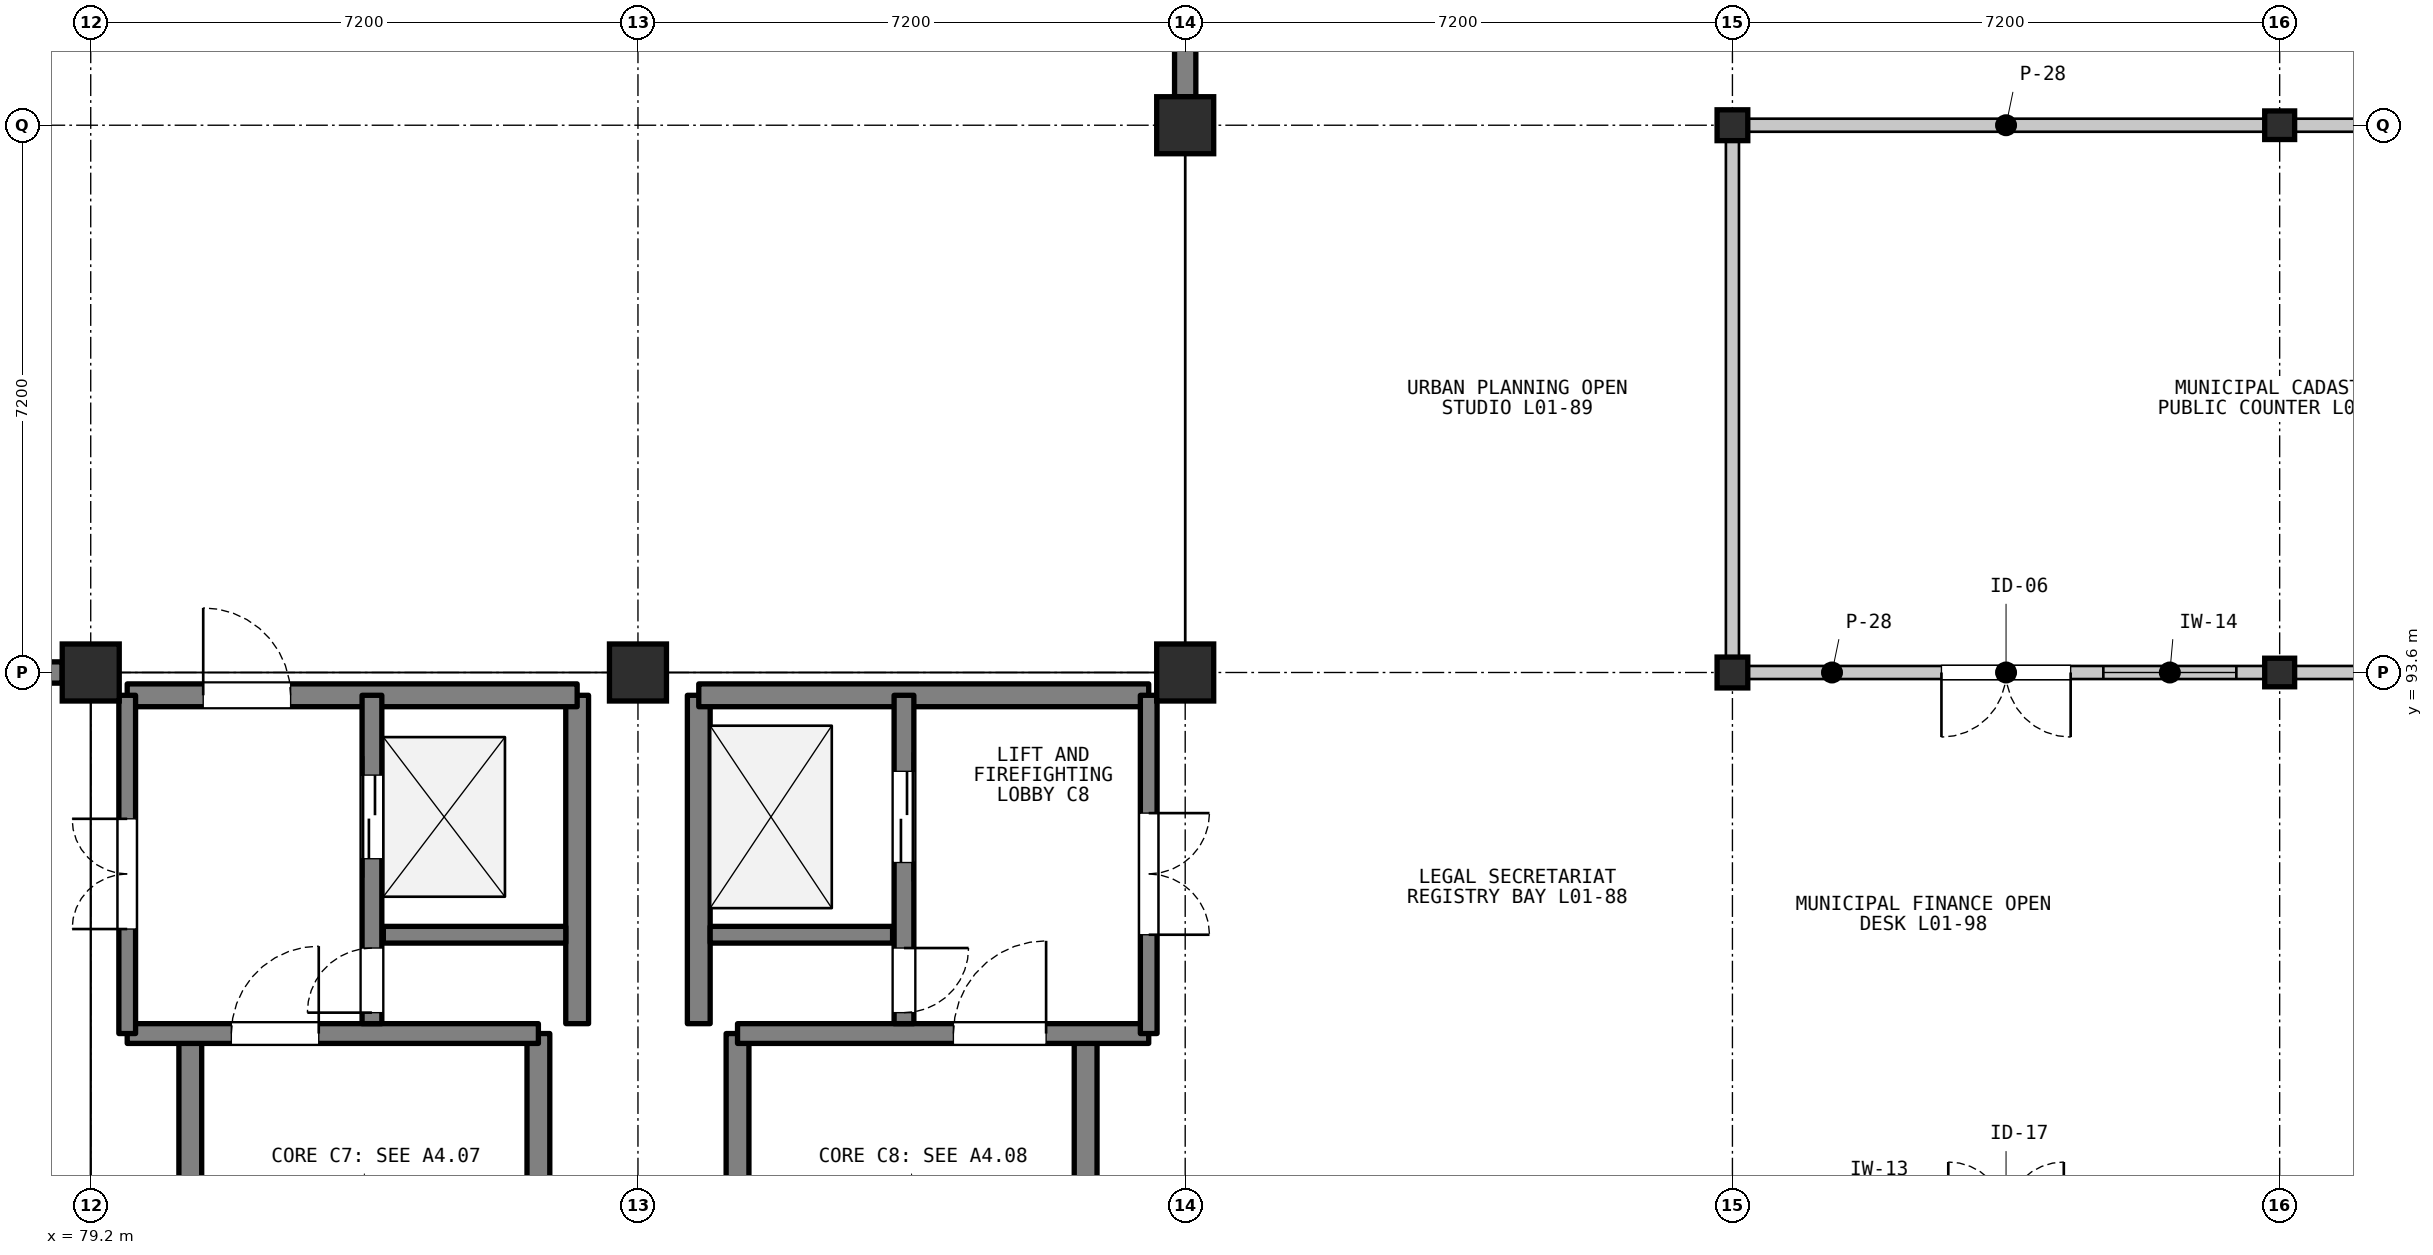
"""IFC4 building model, lengths in metres.
Left out: names, types, materials, properties, quantities, classifications, styles, units other than length and angle.
Written with IfcOpenShell. Run it as: python <this file> out.ifc"""

import sys

from ifc_helpers import new_model, si_unit, direction, frame, frame_2d, origin, origin_2d, place, context, subcontext, project, spatial, rectangle, i_section, extrude, element, fill, save


model = new_model("IFC4")
c1 = context("Model", 3, precision=1e-05, world=origin(), true_north=direction((0.0, 1.0)))
c2 = subcontext(c1, "Body", "Model", "MODEL_VIEW")
j1 = project(units=[si_unit("LENGTHUNIT", "METRE"), si_unit("PLANEANGLEUNIT", "RADIAN")], contexts=[c1])
p1 = place(None, origin())
s1 = spatial("IfcSite", under=j1, at=p1, CompositionType="ELEMENT")
p2 = place(p1, origin())
s2 = spatial("IfcBuilding", under=s1, at=p2, CompositionType="ELEMENT")
p3 = place(p2, origin())
s3 = spatial("IfcBuildingStorey", under=s2, at=p3, CompositionType="ELEMENT", Elevation=0.0)
for number, where, z_axis, x_axis in (
    (1, (79.2, 93.6, 0.0), (0.0, 0.0, 1.0), (1.0, 0.0, 0.0)),
    (2, (86.4, 93.6, 0.0), (0.0, 0.0, 1.0), (1.0, 0.0, 0.0)),
    (3, (93.6, 93.6, 0.0), (0.0, 0.0, 1.0), (1.0, 0.0, 0.0)),
    (4, (93.6, 100.8, 0.0), (0.0, 0.0, 1.0), (1.0, 0.0, 0.0)),
):
    element("IfcColumn", number, at=place(p3, frame(where, z_axis=z_axis, x_axis=x_axis)), inside=s3, PredefinedType="COLUMN", context=c2, shape_type="SweptSolid", body=[
        extrude(rectangle(XDim=0.75, YDim=0.75, at=origin_2d()), origin(), (0.0, 0.0, 1.0), 5.4),
    ])
for number, where, z_axis, x_axis in (
    (5, (100.8, 93.6, 0.0), (0.0, 0.0, 1.0), (1.0, 0.0, 0.0)),
    (6, (100.8, 100.8, 0.0), (0.0, 0.0, 1.0), (1.0, 0.0, 0.0)),
):
    element("IfcColumn", number, at=place(p3, frame(where, z_axis=z_axis, x_axis=x_axis)), inside=s3, PredefinedType="COLUMN", context=c2, shape_type="SweptSolid", body=[
        extrude(i_section(OverallWidth=0.404, OverallDepth=0.406, WebThickness=0.027, FlangeThickness=0.044, FilletRadius=0.015, at=origin_2d()), origin(), (0.0, 0.0, 1.0), 5.4),
    ])
for number, where, z_axis, x_axis in (
    (7, (108.0, 93.6, 0.0), (0.0, 0.0, 1.0), (1.0, 0.0, 0.0)),
    (8, (108.0, 100.8, 0.0), (0.0, 0.0, 1.0), (1.0, 0.0, 0.0)),
):
    element("IfcColumn", number, at=place(p3, frame(where, z_axis=z_axis, x_axis=x_axis)), inside=s3, PredefinedType="COLUMN", context=c2, shape_type="SweptSolid", body=[
        extrude(i_section(OverallWidth=0.394, OverallDepth=0.376, WebThickness=0.017, FlangeThickness=0.028, FilletRadius=0.015, at=origin_2d()), origin(), (0.0, 0.0, 1.0), 5.4),
    ])
p4 = place(p3, frame((72.375, 93.6, 0.0), z_axis=(0.0, 0.0, 1.0), x_axis=(1.0, 0.0, 0.0)))
e9 = element("IfcWall", 9, at=p4, inside=s3, PredefinedType="SOLIDWALL", context=c2, shape_type="SweptSolid", body=[
    extrude(rectangle(XDim=6.45, YDim=0.28, at=frame_2d((3.225, 0.0))), origin(), (0.0, 0.0, 1.0), 4.598),
])
p5 = place(p3, frame((93.6, 101.175, 0.0), z_axis=(0.0, 0.0, 1.0), x_axis=(0.0, 1.0, 0.0)))
e10 = element("IfcWall", 10, at=p5, inside=s3, PredefinedType="SOLIDWALL", context=c2, shape_type="SweptSolid", body=[
    extrude(rectangle(XDim=6.45, YDim=0.28, at=frame_2d((3.225, 0.0))), origin(), (0.0, 0.0, 1.0), 4.667),
])
p6 = place(p5, frame((0.948, 0.0, 0.95)))
e11 = element("IfcOpeningElement", 11, at=p6, cuts=e10, PredefinedType="OPENING", context=c2, shape_type="SweptSolid", body=[
    extrude(rectangle(XDim=1.2, YDim=1.7, at=frame_2d((0.6, 0.85))), frame((0.0, 0.15, 0.0), z_axis=(0.0, -1.0, 0.0), x_axis=(1.0, 0.0, 0.0)), (0.0, 0.0, 1.0), 0.3),
])
p7 = place(p5, frame((4.302, 0.0, 0.95)))
e12 = element("IfcOpeningElement", 12, at=p7, cuts=e10, PredefinedType="OPENING", context=c2, shape_type="SweptSolid", body=[
    extrude(rectangle(XDim=1.2, YDim=1.7, at=frame_2d((0.6, 0.85))), frame((0.0, 0.15, 0.0), z_axis=(0.0, -1.0, 0.0), x_axis=(1.0, 0.0, 0.0)), (0.0, 0.0, 1.0), 0.3),
])
for number, where, z_axis, x_axis in (
    (13, (80.51, 79.55, 0.0), (0.0, 0.0, 1.0), (0.0, 1.0, 0.0)),
    (14, (85.09, 79.55, 0.0), (0.0, 0.0, 1.0), (0.0, 1.0, 0.0)),
):
    element("IfcWall", number, at=place(p3, frame(where, z_axis=z_axis, x_axis=x_axis)), inside=s3, PredefinedType="SHEAR", context=c2, shape_type="SweptSolid", body=[
        extrude(rectangle(XDim=9.3, YDim=0.3, at=frame_2d((4.65, 0.0))), origin(), (0.0, 0.0, 1.0), 5.2),
    ])
p8 = place(p3, frame((79.68, 88.85, 0.0), z_axis=(0.0, 0.0, 1.0), x_axis=(1.0, 0.0, 0.0)))
e15 = element("IfcWall", 15, at=p8, inside=s3, PredefinedType="SHEAR", context=c2, shape_type="SweptSolid", body=[
    extrude(rectangle(XDim=5.41, YDim=0.26, at=frame_2d((2.705, 0.0))), origin(), (0.0, 0.0, 1.0), 5.2),
])
p9 = place(p8, frame((1.37, 0.0, 0.0)))
e16 = element("IfcOpeningElement", 16, at=p9, cuts=e15, PredefinedType="OPENING", context=c2, shape_type="SweptSolid", body=[
    extrude(rectangle(XDim=1.15, YDim=2.15, at=frame_2d((0.575, 1.075))), frame((0.0, 0.14, 0.0), z_axis=(0.0, -1.0, 0.0), x_axis=(1.0, 0.0, 0.0)), (0.0, 0.0, 1.0), 0.28),
])
p10 = place(p3, frame((85.6, 88.98, 0.0), z_axis=(0.0, 0.0, 1.0), x_axis=(0.0, 1.0, 0.0)))
e17 = element("IfcWall", 17, at=p10, inside=s3, PredefinedType="SHEAR", context=c2, shape_type="SweptSolid", body=[
    extrude(rectangle(XDim=4.32, YDim=0.3, at=frame_2d((2.16, 0.0))), origin(), (0.0, 0.0, 1.0), 5.2),
])
p11 = place(p3, frame((79.68, 93.3, 0.0), z_axis=(0.0, 0.0, 1.0), x_axis=(1.0, 0.0, 0.0)))
e18 = element("IfcWall", 18, at=p11, inside=s3, PredefinedType="SHEAR", context=c2, shape_type="SweptSolid", body=[
    extrude(rectangle(XDim=5.92, YDim=0.3, at=frame_2d((2.96, 0.0))), origin(), (0.0, 0.0, 1.0), 5.2),
])
p12 = place(p11, frame((1.0, 0.0, 0.0)))
e19 = element("IfcOpeningElement", 19, at=p12, cuts=e18, PredefinedType="OPENING", context=c2, shape_type="SweptSolid", body=[
    extrude(rectangle(XDim=1.15, YDim=2.15, at=frame_2d((0.575, 1.075))), frame((0.0, 0.16, 0.0), z_axis=(0.0, -1.0, 0.0), x_axis=(1.0, 0.0, 0.0)), (0.0, 0.0, 1.0), 0.32),
])
p13 = place(p3, frame((83.05, 90.15, 0.0), z_axis=(0.0, 0.0, 1.0), x_axis=(1.0, 0.0, 0.0)))
e20 = element("IfcWall", 20, at=p13, inside=s3, PredefinedType="SHEAR", context=c2, shape_type="SweptSolid", body=[
    extrude(rectangle(XDim=2.4, YDim=0.22, at=frame_2d((1.2, 0.0))), origin(), (0.0, 0.0, 1.0), 5.2),
])
p14 = place(p3, frame((82.9, 88.98, 0.0), z_axis=(0.0, 0.0, 1.0), x_axis=(0.0, 1.0, 0.0)))
e21 = element("IfcWall", 21, at=p14, inside=s3, PredefinedType="SHEAR", context=c2, shape_type="SweptSolid", body=[
    extrude(rectangle(XDim=4.32, YDim=0.26, at=frame_2d((2.16, 0.0))), origin(), (0.0, 0.0, 1.0), 5.2),
])
p15 = place(p14, frame((2.17, 0.0, 0.0)))
e22 = element("IfcOpeningElement", 22, at=p15, cuts=e21, PredefinedType="OPENING", context=c2, shape_type="SweptSolid", body=[
    extrude(rectangle(XDim=1.1, YDim=2.15, at=frame_2d((0.55, 1.075))), frame((0.0, 0.14, 0.0), z_axis=(0.0, -1.0, 0.0), x_axis=(1.0, 0.0, 0.0)), (0.0, 0.0, 1.0), 0.28),
])
p16 = place(p14, frame((0.145, 0.0, 0.0)))
e23 = element("IfcOpeningElement", 23, at=p16, cuts=e21, PredefinedType="OPENING", context=c2, shape_type="SweptSolid", body=[
    extrude(rectangle(XDim=0.85, YDim=2.05, at=frame_2d((0.425, 1.025))), frame((0.0, 0.14, 0.0), z_axis=(0.0, -1.0, 0.0), x_axis=(1.0, 0.0, 0.0)), (0.0, 0.0, 1.0), 0.28),
])
p17 = place(p3, frame((79.68, 88.85, 0.0), z_axis=(0.0, 0.0, 1.0), x_axis=(0.0, 1.0, 0.0)))
e24 = element("IfcWall", 24, at=p17, inside=s3, PredefinedType="SHEAR", context=c2, shape_type="SweptSolid", body=[
    extrude(rectangle(XDim=4.45, YDim=0.22, at=frame_2d((2.225, 0.0))), origin(), (0.0, 0.0, 1.0), 5.2),
])
p18 = place(p17, frame((1.375, 0.0, 0.0)))
e25 = element("IfcOpeningElement", 25, at=p18, cuts=e24, PredefinedType="OPENING", context=c2, shape_type="SweptSolid", body=[
    extrude(rectangle(XDim=1.45, YDim=2.2, at=frame_2d((0.725, 1.1))), frame((0.0, 0.12, 0.0), z_axis=(0.0, -1.0, 0.0), x_axis=(1.0, 0.0, 0.0)), (0.0, 0.0, 1.0), 0.24),
])
for number, where, z_axis, x_axis in (
    (26, (87.71, 79.55, 0.0), (0.0, 0.0, 1.0), (0.0, 1.0, 0.0)),
    (27, (92.29, 79.55, 0.0), (0.0, 0.0, 1.0), (0.0, 1.0, 0.0)),
):
    element("IfcWall", number, at=place(p3, frame(where, z_axis=z_axis, x_axis=x_axis)), inside=s3, PredefinedType="SHEAR", context=c2, shape_type="SweptSolid", body=[
        extrude(rectangle(XDim=9.3, YDim=0.3, at=frame_2d((4.65, 0.0))), origin(), (0.0, 0.0, 1.0), 5.2),
    ])
p19 = place(p3, frame((87.71, 88.85, 0.0), z_axis=(0.0, 0.0, 1.0), x_axis=(1.0, 0.0, 0.0)))
e28 = element("IfcWall", 28, at=p19, inside=s3, PredefinedType="SHEAR", context=c2, shape_type="SweptSolid", body=[
    extrude(rectangle(XDim=5.41, YDim=0.26, at=frame_2d((2.705, 0.0))), origin(), (0.0, 0.0, 1.0), 5.2),
])
p20 = place(p19, frame((2.84, 0.0, 0.0)))
e29 = element("IfcOpeningElement", 29, at=p20, cuts=e28, PredefinedType="OPENING", context=c2, shape_type="SweptSolid", body=[
    extrude(rectangle(XDim=1.22, YDim=2.15, at=frame_2d((0.61, 1.075))), frame((0.0, 0.14, 0.0), z_axis=(0.0, -1.0, 0.0), x_axis=(1.0, 0.0, 0.0)), (0.0, 0.0, 1.0), 0.28),
])
p21 = place(p3, frame((87.2, 88.98, 0.0), z_axis=(0.0, 0.0, 1.0), x_axis=(0.0, 1.0, 0.0)))
e30 = element("IfcWall", 30, at=p21, inside=s3, PredefinedType="SHEAR", context=c2, shape_type="SweptSolid", body=[
    extrude(rectangle(XDim=4.32, YDim=0.3, at=frame_2d((2.16, 0.0))), origin(), (0.0, 0.0, 1.0), 5.2),
])
p22 = place(p3, frame((87.2, 93.3, 0.0), z_axis=(0.0, 0.0, 1.0), x_axis=(1.0, 0.0, 0.0)))
e31 = element("IfcWall", 31, at=p22, inside=s3, PredefinedType="SHEAR", context=c2, shape_type="SweptSolid", body=[
    extrude(rectangle(XDim=5.92, YDim=0.3, at=frame_2d((2.96, 0.0))), origin(), (0.0, 0.0, 1.0), 5.2),
])
p23 = place(p3, frame((87.35, 90.15, 0.0), z_axis=(0.0, 0.0, 1.0), x_axis=(1.0, 0.0, 0.0)))
e32 = element("IfcWall", 32, at=p23, inside=s3, PredefinedType="SHEAR", context=c2, shape_type="SweptSolid", body=[
    extrude(rectangle(XDim=2.4, YDim=0.22, at=frame_2d((1.2, 0.0))), origin(), (0.0, 0.0, 1.0), 5.2),
])
p24 = place(p3, frame((89.9, 93.3, 0.0), z_axis=(0.0, 0.0, 1.0), x_axis=(0.0, -1.0, 0.0)))
e33 = element("IfcWall", 33, at=p24, inside=s3, PredefinedType="SHEAR", context=c2, shape_type="SweptSolid", body=[
    extrude(rectangle(XDim=4.32, YDim=0.26, at=frame_2d((2.16, 0.0))), origin(), (0.0, 0.0, 1.0), 5.2),
])
p25 = place(p24, frame((1.0, 0.0, 0.0)))
e34 = element("IfcOpeningElement", 34, at=p25, cuts=e33, PredefinedType="OPENING", context=c2, shape_type="SweptSolid", body=[
    extrude(rectangle(XDim=1.2, YDim=2.15, at=frame_2d((0.6, 1.075))), frame((0.0, 0.14, 0.0), z_axis=(0.0, -1.0, 0.0), x_axis=(1.0, 0.0, 0.0)), (0.0, 0.0, 1.0), 0.28),
])
p26 = place(p24, frame((3.325, 0.0, 0.0)))
e35 = element("IfcOpeningElement", 35, at=p26, cuts=e33, PredefinedType="OPENING", context=c2, shape_type="SweptSolid", body=[
    extrude(rectangle(XDim=0.85, YDim=2.05, at=frame_2d((0.425, 1.025))), frame((0.0, 0.14, 0.0), z_axis=(0.0, -1.0, 0.0), x_axis=(1.0, 0.0, 0.0)), (0.0, 0.0, 1.0), 0.28),
])
p27 = place(p3, frame((93.12, 93.3, 0.0), z_axis=(0.0, 0.0, 1.0), x_axis=(0.0, -1.0, 0.0)))
e36 = element("IfcWall", 36, at=p27, inside=s3, PredefinedType="SHEAR", context=c2, shape_type="SweptSolid", body=[
    extrude(rectangle(XDim=4.45, YDim=0.22, at=frame_2d((2.225, 0.0))), origin(), (0.0, 0.0, 1.0), 5.2),
])
p28 = place(p27, frame((1.55, 0.0, 0.0)))
e37 = element("IfcOpeningElement", 37, at=p28, cuts=e36, PredefinedType="OPENING", context=c2, shape_type="SweptSolid", body=[
    extrude(rectangle(XDim=1.6, YDim=2.2, at=frame_2d((0.8, 1.1))), frame((0.0, 0.12, 0.0), z_axis=(0.0, -1.0, 0.0), x_axis=(1.0, 0.0, 0.0)), (0.0, 0.0, 1.0), 0.24),
])
p29 = place(p3, frame((107.88, 93.6, 0.0), z_axis=(0.0, 0.0, 1.0), x_axis=(-1.0, 0.0, 0.0)))
e38 = element("IfcWall", 38, at=p29, inside=s3, PredefinedType="PARTITIONING", context=c2, shape_type="SweptSolid", body=[
    extrude(rectangle(XDim=6.96, YDim=0.172, at=frame_2d((3.48, 0.0))), origin(), (0.0, 0.0, 1.0), 4.588),
])
p30 = place(p29, frame((2.63, 0.0, 0.0)))
e39 = element("IfcOpeningElement", 39, at=p30, cuts=e38, PredefinedType="OPENING", context=c2, shape_type="SweptSolid", body=[
    extrude(rectangle(XDim=1.7, YDim=2.35, at=frame_2d((0.85, 1.175))), frame((0.0, 0.096, 0.0), z_axis=(0.0, -1.0, 0.0), x_axis=(1.0, 0.0, 0.0)), (0.0, 0.0, 1.0), 0.192),
])
p31 = place(p29, frame((0.45, 0.0, 1.05)))
e40 = element("IfcOpeningElement", 40, at=p31, cuts=e38, PredefinedType="OPENING", context=c2, shape_type="SweptSolid", body=[
    extrude(rectangle(XDim=1.75, YDim=1.18, at=frame_2d((0.875, 0.59))), frame((0.0, 0.096, 0.0), z_axis=(0.0, -1.0, 0.0), x_axis=(1.0, 0.0, 0.0)), (0.0, 0.0, 1.0), 0.192),
])
p32 = place(p3, frame((114.92, 93.6, 0.0), z_axis=(0.0, 0.0, 1.0), x_axis=(-1.0, 0.0, 0.0)))
e41 = element("IfcWall", 41, at=p32, inside=s3, PredefinedType="PARTITIONING", context=c2, shape_type="SweptSolid", body=[
    extrude(rectangle(XDim=6.8, YDim=0.172, at=frame_2d((3.4, 0.0))), origin(), (0.0, 0.0, 1.0), 4.588),
])
for number, where, z_axis, x_axis in (
    (42, (100.92, 100.8, 0.0), (0.0, 0.0, 1.0), (1.0, 0.0, 0.0)),
    (43, (108.12, 100.8, 0.0), (0.0, 0.0, 1.0), (1.0, 0.0, 0.0)),
    (44, (100.8, 93.72, 0.0), (0.0, 0.0, 1.0), (0.0, 1.0, 0.0)),
):
    element("IfcWall", number, at=place(p3, frame(where, z_axis=z_axis, x_axis=x_axis)), inside=s3, PredefinedType="PARTITIONING", context=c2, shape_type="SweptSolid", body=[
        extrude(rectangle(XDim=6.96, YDim=0.172, at=frame_2d((3.48, 0.0))), origin(), (0.0, 0.0, 1.0), 4.588),
    ])
p33 = place(p9, origin())
e45 = element("IfcDoor", 45, at=p33, inside=s3, OperationType="SINGLE_SWING_RIGHT", PredefinedType="DOOR", context=c2, shape_type="SweptSolid", body=[
    extrude(rectangle(XDim=1.15, YDim=2.15, at=frame_2d((0.575, 1.075))), frame((0.0, 0.025, 0.0), z_axis=(0.0, -1.0, 0.0), x_axis=(1.0, 0.0, 0.0)), (0.0, 0.0, 1.0), 0.05),
])
fill(e16, e45)
p34 = place(p12, origin())
e46 = element("IfcDoor", 46, at=p34, inside=s3, OperationType="SINGLE_SWING_LEFT", PredefinedType="DOOR", context=c2, shape_type="SweptSolid", body=[
    extrude(rectangle(XDim=1.15, YDim=2.15, at=frame_2d((0.575, 1.075))), frame((0.0, 0.025, 0.0), z_axis=(0.0, -1.0, 0.0), x_axis=(1.0, 0.0, 0.0)), (0.0, 0.0, 1.0), 0.05),
])
fill(e19, e46)
p35 = place(p15, origin())
e47 = element("IfcDoor", 47, at=p35, inside=s3, OperationType="DOUBLE_DOOR_SLIDING", PredefinedType="DOOR", context=c2, shape_type="SweptSolid", body=[
    extrude(rectangle(XDim=1.1, YDim=2.15, at=frame_2d((0.55, 1.075))), frame((0.0, 0.025, 0.0), z_axis=(0.0, -1.0, 0.0), x_axis=(1.0, 0.0, 0.0)), (0.0, 0.0, 1.0), 0.05),
])
fill(e22, e47)
p36 = place(p16, origin())
e48 = element("IfcDoor", 48, at=p36, inside=s3, OperationType="SINGLE_SWING_LEFT", PredefinedType="DOOR", context=c2, shape_type="SweptSolid", body=[
    extrude(rectangle(XDim=0.85, YDim=2.05, at=frame_2d((0.425, 1.025))), frame((0.0, 0.025, 0.0), z_axis=(0.0, -1.0, 0.0), x_axis=(1.0, 0.0, 0.0)), (0.0, 0.0, 1.0), 0.05),
])
fill(e23, e48)
p37 = place(p18, origin())
e49 = element("IfcDoor", 49, at=p37, inside=s3, OperationType="DOUBLE_DOOR_SINGLE_SWING", PredefinedType="DOOR", context=c2, shape_type="SweptSolid", body=[
    extrude(rectangle(XDim=1.45, YDim=2.2, at=frame_2d((0.725, 1.1))), frame((0.0, 0.025, 0.0), z_axis=(0.0, -1.0, 0.0), x_axis=(1.0, 0.0, 0.0)), (0.0, 0.0, 1.0), 0.05),
])
fill(e25, e49)
p38 = place(p20, origin())
e50 = element("IfcDoor", 50, at=p38, inside=s3, OperationType="SINGLE_SWING_RIGHT", PredefinedType="DOOR", context=c2, shape_type="SweptSolid", body=[
    extrude(rectangle(XDim=1.22, YDim=2.15, at=frame_2d((0.61, 1.075))), frame((0.0, 0.025, 0.0), z_axis=(0.0, -1.0, 0.0), x_axis=(1.0, 0.0, 0.0)), (0.0, 0.0, 1.0), 0.05),
])
fill(e29, e50)
p39 = place(p25, origin())
e51 = element("IfcDoor", 51, at=p39, inside=s3, OperationType="DOUBLE_DOOR_SLIDING", PredefinedType="DOOR", context=c2, shape_type="SweptSolid", body=[
    extrude(rectangle(XDim=1.2, YDim=2.15, at=frame_2d((0.6, 1.075))), frame((0.0, 0.025, 0.0), z_axis=(0.0, -1.0, 0.0), x_axis=(1.0, 0.0, 0.0)), (0.0, 0.0, 1.0), 0.05),
])
fill(e34, e51)
p40 = place(p26, origin())
e52 = element("IfcDoor", 52, at=p40, inside=s3, OperationType="SINGLE_SWING_LEFT", PredefinedType="DOOR", context=c2, shape_type="SweptSolid", body=[
    extrude(rectangle(XDim=0.85, YDim=2.05, at=frame_2d((0.425, 1.025))), frame((0.0, 0.025, 0.0), z_axis=(0.0, -1.0, 0.0), x_axis=(1.0, 0.0, 0.0)), (0.0, 0.0, 1.0), 0.05),
])
fill(e35, e52)
p41 = place(p28, origin())
e53 = element("IfcDoor", 53, at=p41, inside=s3, OperationType="DOUBLE_DOOR_SINGLE_SWING", PredefinedType="DOOR", context=c2, shape_type="SweptSolid", body=[
    extrude(rectangle(XDim=1.6, YDim=2.2, at=frame_2d((0.8, 1.1))), frame((0.0, 0.025, 0.0), z_axis=(0.0, -1.0, 0.0), x_axis=(1.0, 0.0, 0.0)), (0.0, 0.0, 1.0), 0.05),
])
fill(e37, e53)
p42 = place(p30, origin())
e54 = element("IfcDoor", 54, at=p42, inside=s3, OperationType="DOUBLE_DOOR_SINGLE_SWING", PredefinedType="DOOR", context=c2, shape_type="SweptSolid", body=[
    extrude(rectangle(XDim=1.7, YDim=2.35, at=frame_2d((0.85, 1.175))), frame((0.0, 0.025, 0.0), z_axis=(0.0, -1.0, 0.0), x_axis=(1.0, 0.0, 0.0)), (0.0, 0.0, 1.0), 0.05),
])
fill(e39, e54)
p43 = place(p31, origin())
e55 = element("IfcWindow", 55, at=p43, inside=s3, PartitioningType="SINGLE_PANEL", PredefinedType="WINDOW", context=c2, shape_type="SweptSolid", body=[
    extrude(rectangle(XDim=1.75, YDim=1.18, at=frame_2d((0.875, 0.59))), frame((0.0, 0.03, 0.0), z_axis=(0.0, -1.0, 0.0), x_axis=(1.0, 0.0, 0.0)), (0.0, 0.0, 1.0), 0.06),
])
fill(e40, e55)
save(model, sys.argv[1])
